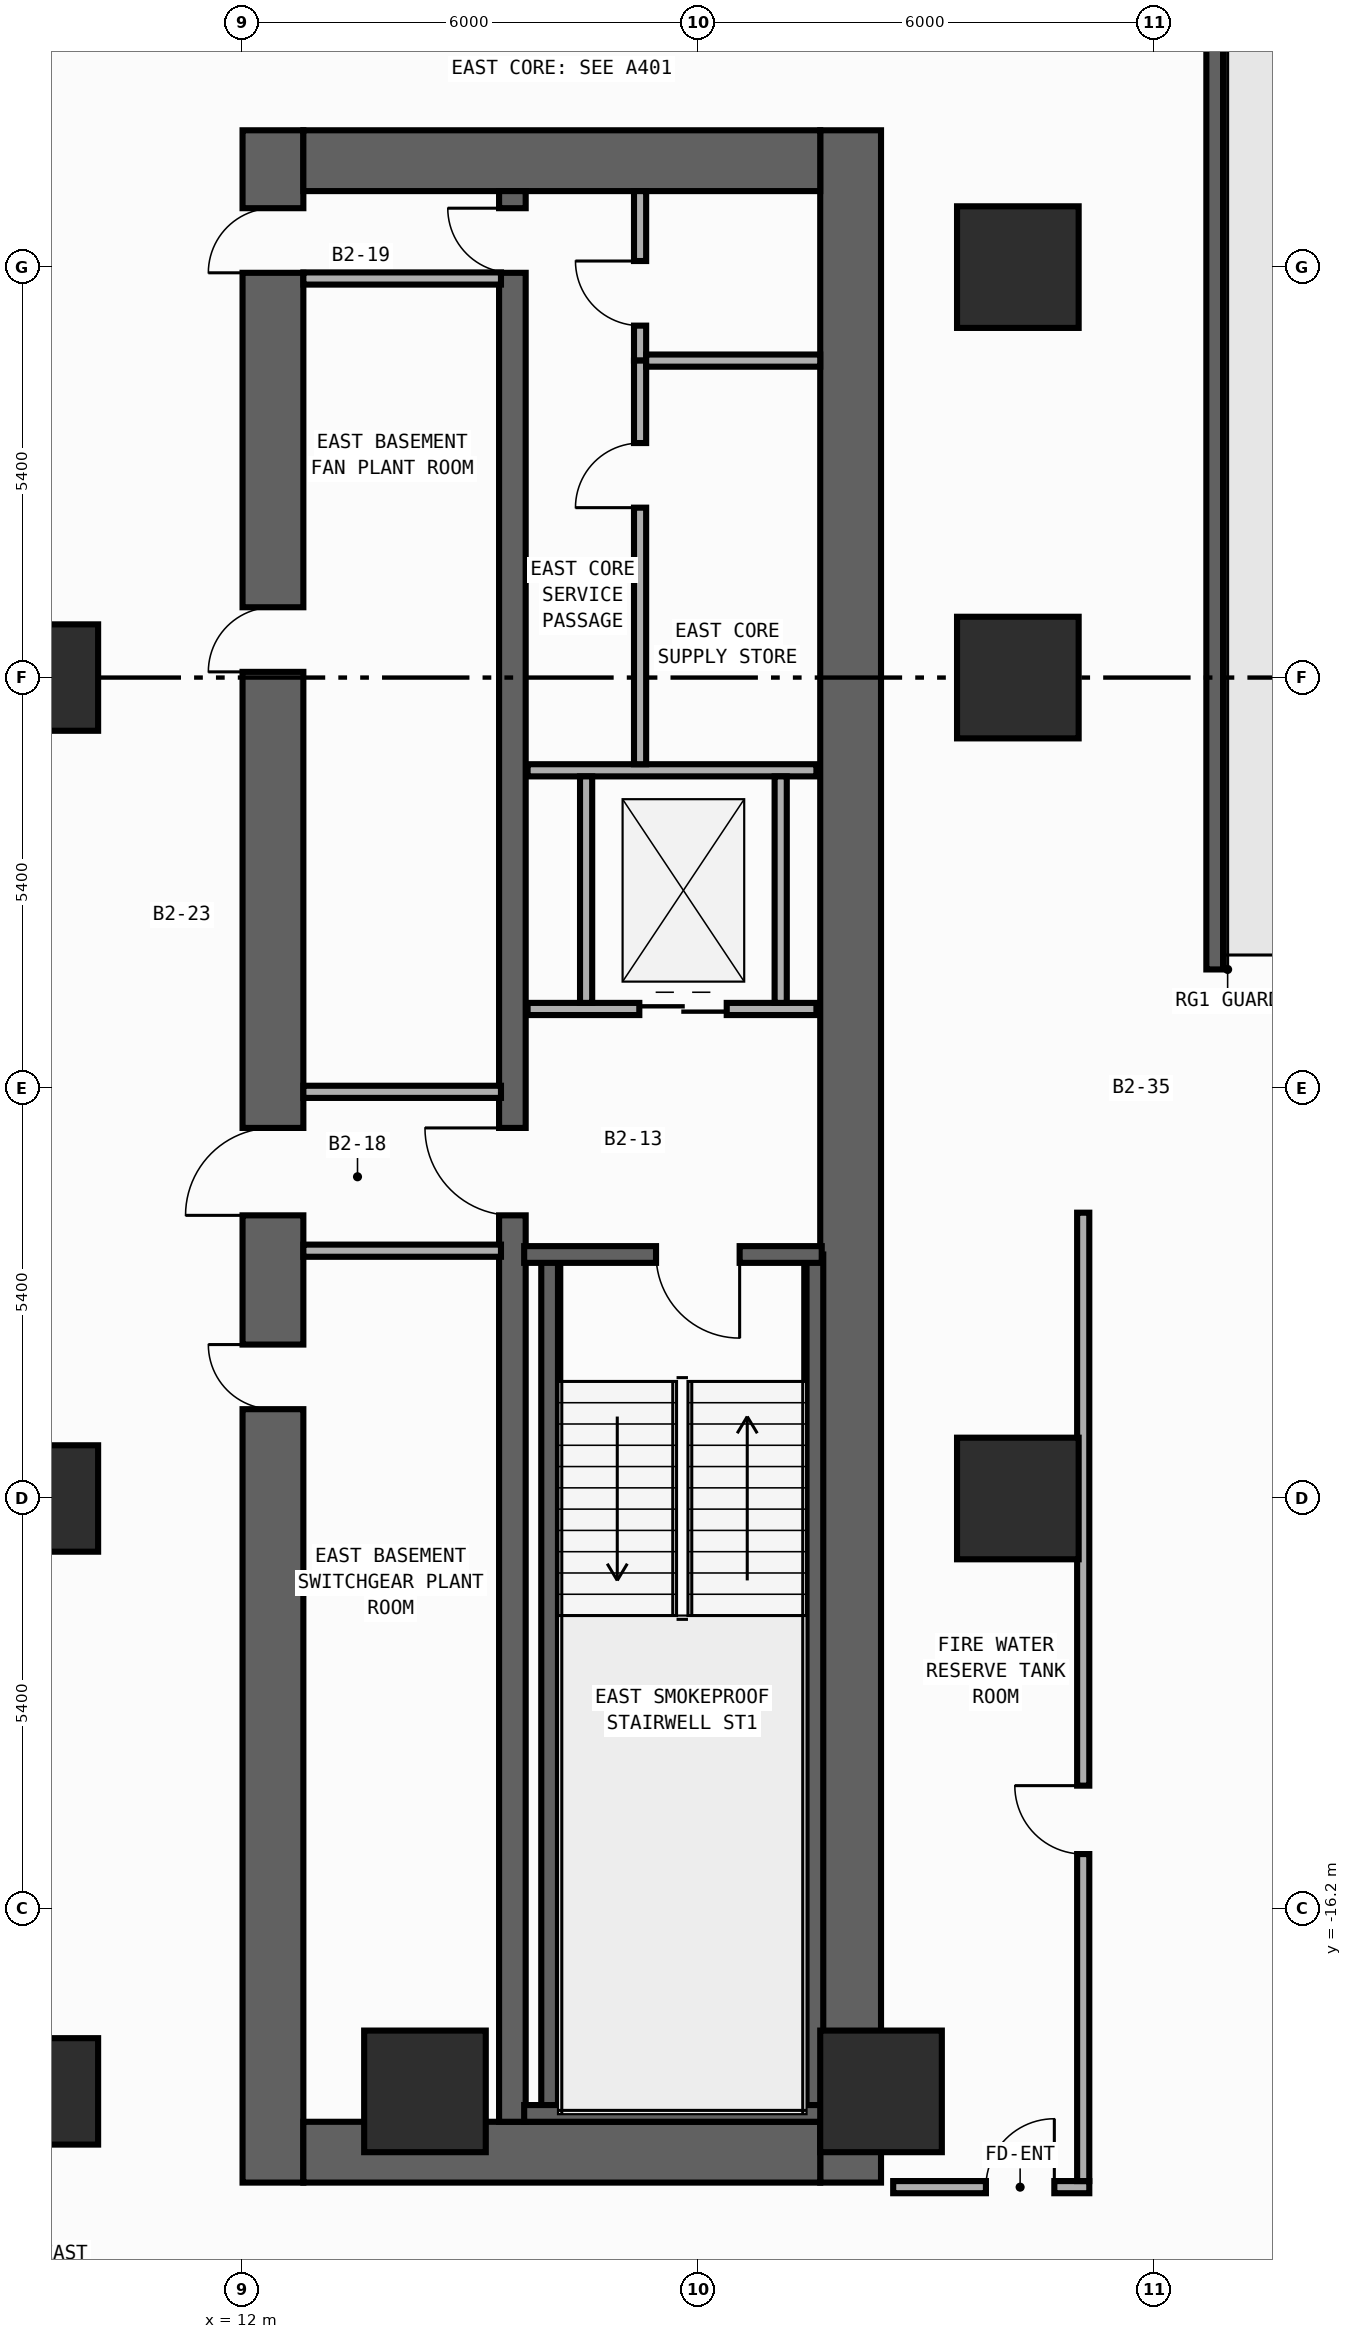
"""IFC4 building model, lengths in metres.
Left out: names, types, materials, properties, quantities, classifications, styles, units other than length and angle.
Written with IfcOpenShell. Run it as: python <this file> out.ifc"""

import sys

from ifc_helpers import new_model, si_unit, direction, frame, frame_2d, origin, origin_2d, place, context, subcontext, project, spatial, polyline, rectangle, outline, extrude, element, fill, save


model = new_model("IFC4")
c1 = context("Model", 3, precision=1e-05, world=origin(), true_north=direction((0.0, 1.0)))
c2 = subcontext(c1, "Body", "Model", "MODEL_VIEW")
j1 = project(units=[si_unit("LENGTHUNIT", "METRE"), si_unit("PLANEANGLEUNIT", "RADIAN")], contexts=[c1])
p1 = place(None, origin())
s1 = spatial("IfcSite", under=j1, at=p1, CompositionType="ELEMENT")
p2 = place(p1, origin())
s2 = spatial("IfcBuilding", under=s1, at=p2, CompositionType="ELEMENT")
p3 = place(p2, frame((0.0, 0.0, -9.0)))
s3 = spatial("IfcBuildingStorey", under=s2, at=p3, CompositionType="ELEMENT", Elevation=-9.0)
p4 = place(p3, frame((12.4, -19.8, 0.0), z_axis=(0.0, 0.0, 1.0), x_axis=(0.0, 1.0, 0.0)))
e1 = element("IfcWall", 1, at=p4, inside=s3, PredefinedType="SHEAR", context=c2, shape_type="SweptSolid", body=[
    extrude(rectangle(XDim=27.0, YDim=0.8, at=frame_2d((13.5, 0.0))), origin(), (0.0, 0.0, 1.0), 4.2),
])
p5 = place(p4, frame((19.875, 0.0, 0.0)))
e2 = element("IfcOpeningElement", 2, at=p5, cuts=e1, PredefinedType="OPENING", context=c2, shape_type="SweptSolid", body=[
    extrude(rectangle(XDim=0.85, YDim=2.1, at=frame_2d((0.425, 1.05))), frame((0.0, 0.41, 0.0), z_axis=(0.0, -1.0, 0.0), x_axis=(1.0, 0.0, 0.0)), (0.0, 0.0, 1.0), 0.82),
])
p6 = place(p4, frame((10.175, 0.0, 0.0)))
e3 = element("IfcOpeningElement", 3, at=p6, cuts=e1, PredefinedType="OPENING", context=c2, shape_type="SweptSolid", body=[
    extrude(rectangle(XDim=0.85, YDim=2.1, at=frame_2d((0.425, 1.05))), frame((0.0, 0.41, 0.0), z_axis=(0.0, -1.0, 0.0), x_axis=(1.0, 0.0, 0.0)), (0.0, 0.0, 1.0), 0.82),
])
p7 = place(p4, frame((12.725, 0.0, 0.0)))
e4 = element("IfcOpeningElement", 4, at=p7, cuts=e1, PredefinedType="OPENING", context=c2, shape_type="SweptSolid", body=[
    extrude(rectangle(XDim=1.15, YDim=2.2, at=frame_2d((0.575, 1.1))), frame((0.0, 0.41, 0.0), z_axis=(0.0, -1.0, 0.0), x_axis=(1.0, 0.0, 0.0)), (0.0, 0.0, 1.0), 0.82),
])
p8 = place(p4, frame((25.125, 0.0, 0.0)))
e5 = element("IfcOpeningElement", 5, at=p8, cuts=e1, PredefinedType="OPENING", context=c2, shape_type="SweptSolid", body=[
    extrude(rectangle(XDim=0.85, YDim=2.1, at=frame_2d((0.425, 1.05))), frame((0.0, 0.41, 0.0), z_axis=(0.0, -1.0, 0.0), x_axis=(1.0, 0.0, 0.0)), (0.0, 0.0, 1.0), 0.82),
])
p9 = place(p3, frame((20.0, -19.8, 0.0), z_axis=(0.0, 0.0, 1.0), x_axis=(0.0, 1.0, 0.0)))
e6 = element("IfcWall", 6, at=p9, inside=s3, PredefinedType="SHEAR", context=c2, shape_type="SweptSolid", body=[
    extrude(rectangle(XDim=27.0, YDim=0.8, at=frame_2d((13.5, 0.0))), origin(), (0.0, 0.0, 1.0), 4.2),
])
for number, where, z_axis, x_axis in (
    (7, (12.8, -19.4, 0.0), (0.0, 0.0, 1.0), (1.0, 0.0, 0.0)),
    (8, (12.8, 6.8, 0.0), (0.0, 0.0, 1.0), (1.0, 0.0, 0.0)),
):
    element("IfcWall", number, at=place(p3, frame(where, z_axis=z_axis, x_axis=x_axis)), inside=s3, PredefinedType="SHEAR", context=c2, shape_type="SweptSolid", body=[
        extrude(rectangle(XDim=6.8, YDim=0.8, at=frame_2d((3.4, 0.0))), origin(), (0.0, 0.0, 1.0), 4.2),
    ])
p10 = place(p3, frame((15.55, -19.0, 0.0), z_axis=(0.0, 0.0, 1.0), x_axis=(0.0, 1.0, 0.0)))
e9 = element("IfcWall", 9, at=p10, inside=s3, PredefinedType="SHEAR", context=c2, shape_type="SweptSolid", body=[
    extrude(rectangle(XDim=25.4, YDim=0.35, at=frame_2d((12.7, 0.0))), origin(), (0.0, 0.0, 1.0), 4.2),
])
p11 = place(p10, frame((11.925, 0.0, 0.0)))
e10 = element("IfcOpeningElement", 10, at=p11, cuts=e9, PredefinedType="OPENING", context=c2, shape_type="SweptSolid", body=[
    extrude(rectangle(XDim=1.15, YDim=2.2, at=frame_2d((0.575, 1.1))), frame((0.0, 0.185, 0.0), z_axis=(0.0, -1.0, 0.0), x_axis=(1.0, 0.0, 0.0)), (0.0, 0.0, 1.0), 0.37),
])
p12 = place(p10, frame((24.325, 0.0, 0.0)))
e11 = element("IfcOpeningElement", 11, at=p12, cuts=e9, PredefinedType="OPENING", context=c2, shape_type="SweptSolid", body=[
    extrude(rectangle(XDim=0.85, YDim=2.1, at=frame_2d((0.425, 1.05))), frame((0.0, 0.185, 0.0), z_axis=(0.0, -1.0, 0.0), x_axis=(1.0, 0.0, 0.0)), (0.0, 0.0, 1.0), 0.37),
])
for number, where, z_axis, x_axis in (
    (12, (16.04, -18.89, 0.0), (0.0, 0.0, 1.0), (0.0, 1.0, 0.0)),
    (13, (19.53, -18.89, 0.0), (0.0, 0.0, 1.0), (0.0, 1.0, 0.0)),
):
    element("IfcWall", number, at=place(p3, frame(where, z_axis=z_axis, x_axis=x_axis)), inside=s3, PredefinedType="SHEAR", context=c2, shape_type="SweptSolid", body=[
        extrude(rectangle(XDim=11.3, YDim=0.22, at=frame_2d((5.65, 0.0))), origin(), (0.0, 0.0, 1.0), 4.2),
    ])
p13 = place(p3, frame((15.705, -18.89, 0.0), z_axis=(0.0, 0.0, 1.0), x_axis=(1.0, 0.0, 0.0)))
e14 = element("IfcWall", 14, at=p13, inside=s3, PredefinedType="SHEAR", context=c2, shape_type="SweptSolid", body=[
    extrude(rectangle(XDim=3.915, YDim=0.22, at=frame_2d((1.958, 0.0))), origin(), (0.0, 0.0, 1.0), 4.2),
])
p14 = place(p3, frame((19.62, -7.59, 0.0), z_axis=(0.0, 0.0, 1.0), x_axis=(-1.0, 0.0, 0.0)))
e15 = element("IfcWall", 15, at=p14, inside=s3, PredefinedType="SHEAR", context=c2, shape_type="SweptSolid", body=[
    extrude(rectangle(XDim=3.915, YDim=0.22, at=frame_2d((1.958, 0.0))), origin(), (0.0, 0.0, 1.0), 4.2),
])
p15 = place(p14, frame((1.08, 0.0, 0.0)))
e16 = element("IfcOpeningElement", 16, at=p15, cuts=e15, PredefinedType="OPENING", context=c2, shape_type="SweptSolid", body=[
    extrude(rectangle(XDim=1.1, YDim=2.2, at=frame_2d((0.55, 1.1))), frame((0.0, 0.12, 0.0), z_axis=(0.0, -1.0, 0.0), x_axis=(1.0, 0.0, 0.0)), (0.0, 0.0, 1.0), 0.24),
])
for number, where, z_axis, x_axis in (
    (17, (9.2, -18.6, 0.0), (0.0, 0.0, 1.0), (1.0, 0.0, 0.0)),
    (18, (9.2, -10.8, 0.0), (0.0, 0.0, 1.0), (1.0, 0.0, 0.0)),
    (19, (9.2, 0.0, 0.0), (0.0, 0.0, 1.0), (1.0, 0.0, 0.0)),
):
    element("IfcColumn", number, at=place(p3, frame(where, z_axis=z_axis, x_axis=x_axis)), inside=s3, PredefinedType="COLUMN", context=c2, shape_type="SweptSolid", body=[
        extrude(rectangle(XDim=1.8, YDim=1.4, at=origin_2d()), origin(), (0.0, 0.0, 1.0), 4.5),
    ])
for number, where, z_axis, x_axis in (
    (20, (20.4, -18.6, 0.0), (0.0, 0.0, 1.0), (1.0, 0.0, 0.0)),
    (21, (14.4, -18.6, 0.0), (0.0, 0.0, 1.0), (1.0, 0.0, 0.0)),
    (22, (22.2, -10.8, 0.0), (0.0, 0.0, 1.0), (1.0, 0.0, 0.0)),
    (23, (22.2, 0.0, 0.0), (0.0, 0.0, 1.0), (1.0, 0.0, 0.0)),
    (24, (22.2, 5.4, 0.0), (0.0, 0.0, 1.0), (1.0, 0.0, 0.0)),
):
    element("IfcColumn", number, at=place(p3, frame(where, z_axis=z_axis, x_axis=x_axis)), inside=s3, PredefinedType="COLUMN", context=c2, shape_type="SweptSolid", body=[
        extrude(rectangle(XDim=1.6, YDim=1.6, at=origin_2d()), origin(), (0.0, 0.0, 1.0), 4.5),
    ])
p16 = place(p3, frame((24.79, -3.84, 0.0), z_axis=(0.0, 0.0, 1.0), x_axis=(0.0, 1.0, 0.0)))
e25 = element("IfcWall", 25, at=p16, inside=s3, PredefinedType="SHEAR", context=c2, shape_type="SweptSolid", body=[
    extrude(outline(polyline([(0.0, 0.0), (30.18, 0.0), (30.18, 4.2), (0.0, 0.02), (0.0, 0.0)])), frame((0.0, 0.11, 0.0), z_axis=(0.0, -1.0, 0.0), x_axis=(1.0, 0.0, 0.0)), (0.0, 0.0, 1.0), 0.22),
])
p17 = place(p3, frame((15.75, -4.36, 0.0), z_axis=(0.0, 0.0, 1.0), x_axis=(1.0, 0.0, 0.0)))
e26 = element("IfcWall", 26, at=p17, inside=s3, PredefinedType="STANDARD", context=c2, shape_type="SweptSolid", body=[
    extrude(rectangle(XDim=3.8, YDim=0.16, at=frame_2d((1.9, 0.0))), origin(), (0.0, 0.0, 1.0), 4.2),
])
p18 = place(p17, frame((1.47, 0.0, 0.0)))
e27 = element("IfcOpeningElement", 27, at=p18, cuts=e26, PredefinedType="OPENING", context=c2, shape_type="SweptSolid", body=[
    extrude(rectangle(XDim=1.15, YDim=2.2, at=frame_2d((0.575, 1.1))), frame((0.0, 0.09, 0.0), z_axis=(0.0, -1.0, 0.0), x_axis=(1.0, 0.0, 0.0)), (0.0, 0.0, 1.0), 0.18),
])
p19 = place(p3, frame((15.75, -1.22, 0.0), z_axis=(0.0, 0.0, 1.0), x_axis=(1.0, 0.0, 0.0)))
e28 = element("IfcWall", 28, at=p19, inside=s3, PredefinedType="STANDARD", context=c2, shape_type="SweptSolid", body=[
    extrude(rectangle(XDim=3.8, YDim=0.16, at=frame_2d((1.9, 0.0))), origin(), (0.0, 0.0, 1.0), 4.2),
])
for number, where, z_axis, x_axis in (
    (29, (16.52, -4.28, 0.0), (0.0, 0.0, 1.0), (0.0, 1.0, 0.0)),
    (30, (19.08, -4.28, 0.0), (0.0, 0.0, 1.0), (0.0, 1.0, 0.0)),
):
    element("IfcWall", number, at=place(p3, frame(where, z_axis=z_axis, x_axis=x_axis)), inside=s3, PredefinedType="STANDARD", context=c2, shape_type="SweptSolid", body=[
        extrude(rectangle(XDim=2.98, YDim=0.16, at=frame_2d((1.49, 0.0))), origin(), (0.0, 0.0, 1.0), 4.2),
    ])
for number, where, z_axis, x_axis in (
    (31, (12.8, -5.45, 0.0), (0.0, 0.0, 1.0), (1.0, 0.0, 0.0)),
    (32, (12.8, -7.54, 0.0), (0.0, 0.0, 1.0), (1.0, 0.0, 0.0)),
    (33, (12.8, 5.25, 0.0), (0.0, 0.0, 1.0), (1.0, 0.0, 0.0)),
):
    element("IfcWall", number, at=place(p3, frame(where, z_axis=z_axis, x_axis=x_axis)), inside=s3, PredefinedType="STANDARD", context=c2, shape_type="SweptSolid", body=[
        extrude(rectangle(XDim=2.6, YDim=0.16, at=frame_2d((1.3, 0.0))), origin(), (0.0, 0.0, 1.0), 4.2),
    ])
p20 = place(p3, frame((17.23, 4.17, 0.0), z_axis=(0.0, 0.0, 1.0), x_axis=(0.0, 1.0, 0.0)))
e34 = element("IfcWall", 34, at=p20, inside=s3, PredefinedType="PARTITIONING", context=c2, shape_type="SweptSolid", body=[
    extrude(rectangle(XDim=2.23, YDim=0.16, at=frame_2d((1.115, 0.0))), origin(), (0.0, 0.0, 1.0), 4.2),
])
p21 = place(p20, frame((0.46, 0.0, 0.0)))
e35 = element("IfcOpeningElement", 35, at=p21, cuts=e34, PredefinedType="OPENING", context=c2, shape_type="SweptSolid", body=[
    extrude(rectangle(XDim=0.85, YDim=2.1, at=frame_2d((0.425, 1.05))), frame((0.0, 0.09, 0.0), z_axis=(0.0, -1.0, 0.0), x_axis=(1.0, 0.0, 0.0)), (0.0, 0.0, 1.0), 0.18),
])
p22 = place(p3, frame((17.23, -1.14, 0.0), z_axis=(0.0, 0.0, 1.0), x_axis=(0.0, 1.0, 0.0)))
e36 = element("IfcWall", 36, at=p22, inside=s3, PredefinedType="PARTITIONING", context=c2, shape_type="SweptSolid", body=[
    extrude(rectangle(XDim=5.31, YDim=0.16, at=frame_2d((2.655, 0.0))), origin(), (0.0, 0.0, 1.0), 4.2),
])
p23 = place(p22, frame((3.375, 0.0, 0.0)))
e37 = element("IfcOpeningElement", 37, at=p23, cuts=e36, PredefinedType="OPENING", context=c2, shape_type="SweptSolid", body=[
    extrude(rectangle(XDim=0.85, YDim=2.1, at=frame_2d((0.425, 1.05))), frame((0.0, 0.09, 0.0), z_axis=(0.0, -1.0, 0.0), x_axis=(1.0, 0.0, 0.0)), (0.0, 0.0, 1.0), 0.18),
])
p24 = place(p3, frame((17.31, 4.17, 0.0), z_axis=(0.0, 0.0, 1.0), x_axis=(1.0, 0.0, 0.0)))
e38 = element("IfcWall", 38, at=p24, inside=s3, PredefinedType="PARTITIONING", context=c2, shape_type="SweptSolid", body=[
    extrude(rectangle(XDim=2.29, YDim=0.16, at=frame_2d((1.145, 0.0))), origin(), (0.0, 0.0, 1.0), 4.2),
])
p25 = place(p3, frame((20.56, -19.86, 0.0), z_axis=(0.0, 0.0, 1.0), x_axis=(1.0, 0.0, 0.0)))
e39 = element("IfcWall", 39, at=p25, inside=s3, PredefinedType="PARTITIONING", context=c2, shape_type="SweptSolid", body=[
    extrude(rectangle(XDim=2.58, YDim=0.16, at=frame_2d((1.29, 0.0))), origin(), (0.0, 0.0, 1.0), 4.2),
])
p26 = place(p25, frame((1.22, 0.0, 0.0)))
e40 = element("IfcOpeningElement", 40, at=p26, cuts=e39, PredefinedType="OPENING", context=c2, shape_type="SweptSolid", body=[
    extrude(rectangle(XDim=0.9, YDim=2.15, at=frame_2d((0.45, 1.075))), frame((0.0, 0.09, 0.0), z_axis=(0.0, -1.0, 0.0), x_axis=(1.0, 0.0, 0.0)), (0.0, 0.0, 1.0), 0.18),
])
p27 = place(p3, frame((23.06, -19.78, 0.0), z_axis=(0.0, 0.0, 1.0), x_axis=(0.0, 1.0, 0.0)))
e41 = element("IfcWall", 41, at=p27, inside=s3, PredefinedType="PARTITIONING", context=c2, shape_type="SweptSolid", body=[
    extrude(rectangle(XDim=12.74, YDim=0.16, at=frame_2d((6.37, 0.0))), origin(), (0.0, 0.0, 1.0), 4.2),
])
p28 = place(p27, frame((4.302, 0.0, 0.0)))
e42 = element("IfcOpeningElement", 42, at=p28, cuts=e41, PredefinedType="OPENING", context=c2, shape_type="SweptSolid", body=[
    extrude(rectangle(XDim=0.9, YDim=2.15, at=frame_2d((0.45, 1.075))), frame((0.0, 0.09, 0.0), z_axis=(0.0, -1.0, 0.0), x_axis=(1.0, 0.0, 0.0)), (0.0, 0.0, 1.0), 0.18),
])
p29 = place(p15, origin())
e43 = element("IfcDoor", 43, at=p29, inside=s3, OperationType="SINGLE_SWING_LEFT", PredefinedType="DOOR", context=c2, shape_type="SweptSolid", body=[
    extrude(rectangle(XDim=1.1, YDim=2.2, at=frame_2d((0.55, 1.1))), frame((0.0, 0.025, 0.0), z_axis=(0.0, -1.0, 0.0), x_axis=(1.0, 0.0, 0.0)), (0.0, 0.0, 1.0), 0.05),
])
fill(e16, e43)
p30 = place(p5, origin())
e44 = element("IfcDoor", 44, at=p30, inside=s3, OperationType="SINGLE_SWING_LEFT", PredefinedType="DOOR", context=c2, shape_type="SweptSolid", body=[
    extrude(rectangle(XDim=0.85, YDim=2.1, at=frame_2d((0.425, 1.05))), frame((0.0, 0.025, 0.0), z_axis=(0.0, -1.0, 0.0), x_axis=(1.0, 0.0, 0.0)), (0.0, 0.0, 1.0), 0.05),
])
fill(e2, e44)
p31 = place(p6, origin())
e45 = element("IfcDoor", 45, at=p31, inside=s3, OperationType="SINGLE_SWING_RIGHT", PredefinedType="DOOR", context=c2, shape_type="SweptSolid", body=[
    extrude(rectangle(XDim=0.85, YDim=2.1, at=frame_2d((0.425, 1.05))), frame((0.0, 0.025, 0.0), z_axis=(0.0, -1.0, 0.0), x_axis=(1.0, 0.0, 0.0)), (0.0, 0.0, 1.0), 0.05),
])
fill(e3, e45)
p32 = place(p7, origin())
e46 = element("IfcDoor", 46, at=p32, inside=s3, OperationType="SINGLE_SWING_LEFT", PredefinedType="DOOR", context=c2, shape_type="SweptSolid", body=[
    extrude(rectangle(XDim=1.15, YDim=2.2, at=frame_2d((0.575, 1.1))), frame((0.0, 0.025, 0.0), z_axis=(0.0, -1.0, 0.0), x_axis=(1.0, 0.0, 0.0)), (0.0, 0.0, 1.0), 0.05),
])
fill(e4, e46)
p33 = place(p11, origin())
e47 = element("IfcDoor", 47, at=p33, inside=s3, OperationType="SINGLE_SWING_RIGHT", PredefinedType="DOOR", context=c2, shape_type="SweptSolid", body=[
    extrude(rectangle(XDim=1.15, YDim=2.2, at=frame_2d((0.575, 1.1))), frame((0.0, 0.025, 0.0), z_axis=(0.0, -1.0, 0.0), x_axis=(1.0, 0.0, 0.0)), (0.0, 0.0, 1.0), 0.05),
])
fill(e10, e47)
p34 = place(p8, origin())
e48 = element("IfcDoor", 48, at=p34, inside=s3, OperationType="SINGLE_SWING_LEFT", PredefinedType="DOOR", context=c2, shape_type="SweptSolid", body=[
    extrude(rectangle(XDim=0.85, YDim=2.1, at=frame_2d((0.425, 1.05))), frame((0.0, 0.025, 0.0), z_axis=(0.0, -1.0, 0.0), x_axis=(1.0, 0.0, 0.0)), (0.0, 0.0, 1.0), 0.05),
])
fill(e5, e48)
p35 = place(p12, origin())
e49 = element("IfcDoor", 49, at=p35, inside=s3, OperationType="SINGLE_SWING_RIGHT", PredefinedType="DOOR", context=c2, shape_type="SweptSolid", body=[
    extrude(rectangle(XDim=0.85, YDim=2.1, at=frame_2d((0.425, 1.05))), frame((0.0, 0.025, 0.0), z_axis=(0.0, -1.0, 0.0), x_axis=(1.0, 0.0, 0.0)), (0.0, 0.0, 1.0), 0.05),
])
fill(e11, e49)
p36 = place(p18, origin())
e50 = element("IfcDoor", 50, at=p36, inside=s3, OperationType="DOUBLE_DOOR_SLIDING", PredefinedType="DOOR", context=c2, shape_type="SweptSolid", body=[
    extrude(rectangle(XDim=1.15, YDim=2.2, at=frame_2d((0.575, 1.1))), frame((0.0, 0.025, 0.0), z_axis=(0.0, -1.0, 0.0), x_axis=(1.0, 0.0, 0.0)), (0.0, 0.0, 1.0), 0.05),
])
fill(e27, e50)
p37 = place(p21, origin())
e51 = element("IfcDoor", 51, at=p37, inside=s3, OperationType="SINGLE_SWING_RIGHT", PredefinedType="DOOR", context=c2, shape_type="SweptSolid", body=[
    extrude(rectangle(XDim=0.85, YDim=2.1, at=frame_2d((0.425, 1.05))), frame((0.0, 0.025, 0.0), z_axis=(0.0, -1.0, 0.0), x_axis=(1.0, 0.0, 0.0)), (0.0, 0.0, 1.0), 0.05),
])
fill(e35, e51)
p38 = place(p23, origin())
e52 = element("IfcDoor", 52, at=p38, inside=s3, OperationType="SINGLE_SWING_LEFT", PredefinedType="DOOR", context=c2, shape_type="SweptSolid", body=[
    extrude(rectangle(XDim=0.85, YDim=2.1, at=frame_2d((0.425, 1.05))), frame((0.0, 0.025, 0.0), z_axis=(0.0, -1.0, 0.0), x_axis=(1.0, 0.0, 0.0)), (0.0, 0.0, 1.0), 0.05),
])
fill(e37, e52)
p39 = place(p26, origin())
e53 = element("IfcDoor", 53, at=p39, inside=s3, OperationType="SINGLE_SWING_RIGHT", PredefinedType="DOOR", context=c2, shape_type="SweptSolid", body=[
    extrude(rectangle(XDim=0.9, YDim=2.15, at=frame_2d((0.45, 1.075))), frame((0.0, 0.025, 0.0), z_axis=(0.0, -1.0, 0.0), x_axis=(1.0, 0.0, 0.0)), (0.0, 0.0, 1.0), 0.05),
])
fill(e40, e53)
p40 = place(p28, origin())
e54 = element("IfcDoor", 54, at=p40, inside=s3, OperationType="SINGLE_SWING_RIGHT", PredefinedType="DOOR", context=c2, shape_type="SweptSolid", body=[
    extrude(rectangle(XDim=0.9, YDim=2.15, at=frame_2d((0.45, 1.075))), frame((0.0, 0.025, 0.0), z_axis=(0.0, -1.0, 0.0), x_axis=(1.0, 0.0, 0.0)), (0.0, 0.0, 1.0), 0.05),
])
fill(e42, e54)
save(model, sys.argv[1])
